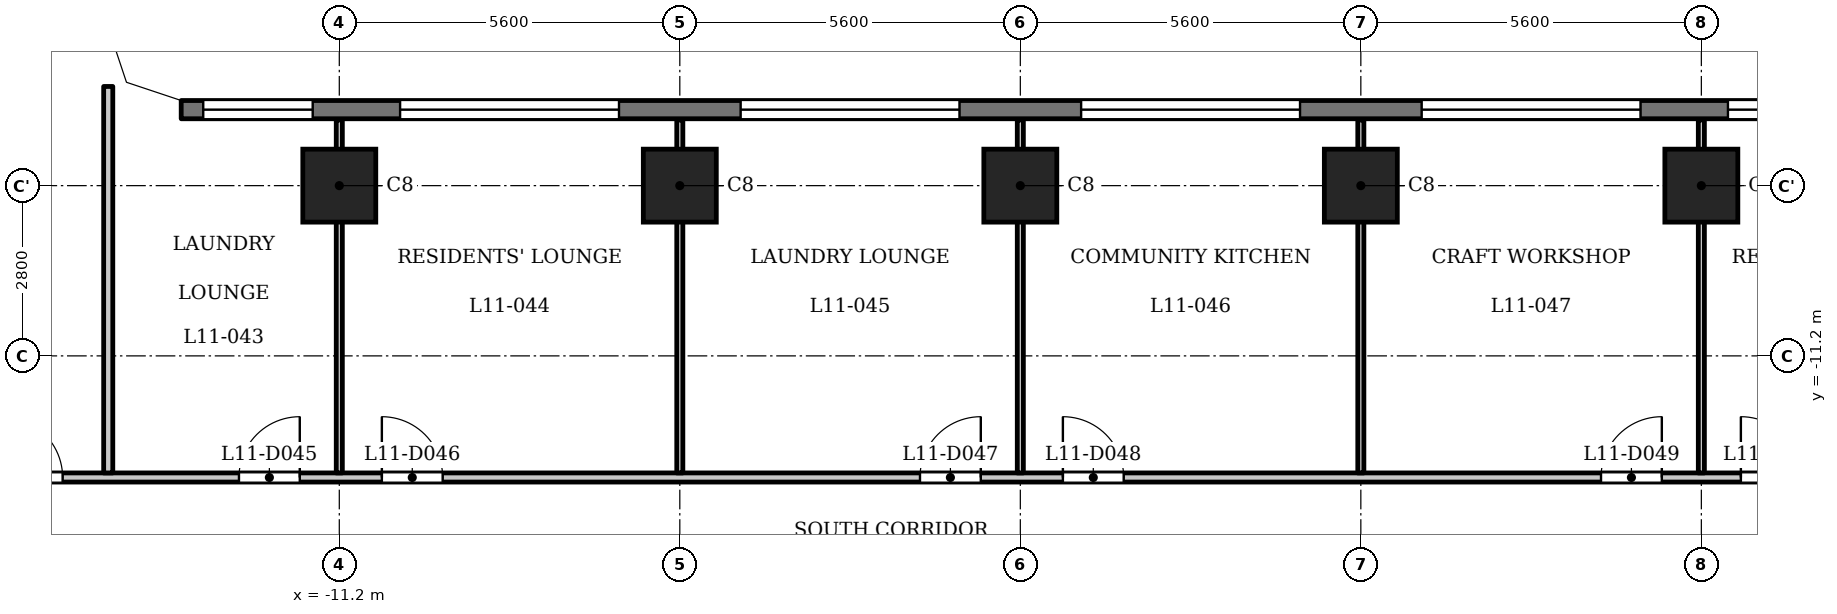
"""IFC4 building model, lengths in metres.
Left out: names, types, materials, properties, quantities, classifications, styles, units other than length and angle.
Written with IfcOpenShell. Run it as: python <this file> out.ifc"""

import sys

from ifc_helpers import new_model, si_unit, direction, frame, frame_2d, origin, origin_2d, place, context, subcontext, project, spatial, polyline, rectangle, outline, extrude, element, fill, save


model = new_model("IFC4")
c1 = context("Model", 3, precision=1e-05, world=origin(), true_north=direction((0.0, 1.0)))
c2 = subcontext(c1, "Body", "Model", "MODEL_VIEW")
j1 = project(units=[si_unit("LENGTHUNIT", "METRE"), si_unit("PLANEANGLEUNIT", "RADIAN")], contexts=[c1])
p1 = place(None, origin())
s1 = spatial("IfcSite", under=j1, at=p1, CompositionType="ELEMENT")
p2 = place(p1, origin())
s2 = spatial("IfcBuilding", under=s1, at=p2, CompositionType="ELEMENT")
p3 = place(p2, frame((0.0, 0.0, 48.0)))
s3 = spatial("IfcBuildingStorey", under=s2, at=p3, CompositionType="ELEMENT", Elevation=48.0)
for number, where, z_axis, x_axis in (
    (1, (-11.2, -8.4, 0.0), (0.0, 0.0, 1.0), (1.0, 0.0, 0.0)),
    (2, (-5.6, -8.4, 0.0), (0.0, 0.0, 1.0), (1.0, 0.0, 0.0)),
    (3, (0.0, -8.4, 0.0), (0.0, 0.0, 1.0), (1.0, 0.0, 0.0)),
    (4, (5.6, -8.4, 0.0), (0.0, 0.0, 1.0), (1.0, 0.0, 0.0)),
    (5, (11.2, -8.4, 0.0), (0.0, 0.0, 1.0), (1.0, 0.0, 0.0)),
):
    element("IfcColumn", number, at=place(p3, frame(where, z_axis=z_axis, x_axis=x_axis)), inside=s3, PredefinedType="COLUMN", context=c2, shape_type="SweptSolid", body=[
        extrude(rectangle(XDim=1.2, YDim=1.2, at=origin_2d()), origin(), (0.0, 0.0, 1.0), 3.5),
    ])
p4 = place(p3, frame((13.8, -7.15, 0.0), z_axis=(0.0, 0.0, 1.0), x_axis=(-1.0, 0.0, 0.0)))
e6 = element("IfcWall", 6, at=p4, inside=s3, PredefinedType="SOLIDWALL", context=c2, shape_type="SweptSolid", body=[
    extrude(rectangle(XDim=27.6, YDim=0.3, at=frame_2d((13.8, 0.0))), origin(), (0.0, 0.0, 1.0), 3.2),
])
p5 = place(p4, frame((0.363, 0.0, 0.9)))
e7 = element("IfcOpeningElement", 7, at=p5, cuts=e6, PredefinedType="OPENING", context=c2, shape_type="SweptSolid", body=[
    extrude(rectangle(XDim=1.8, YDim=1.25, at=frame_2d((0.9, 0.625))), frame((0.0, 0.16, 0.0), z_axis=(0.0, -1.0, 0.0), x_axis=(1.0, 0.0, 0.0)), (0.0, 0.0, 1.0), 0.32),
])
p6 = place(p4, frame((3.6, 0.0, 1.2)))
e8 = element("IfcOpeningElement", 8, at=p6, cuts=e6, PredefinedType="OPENING", context=c2, shape_type="SweptSolid", body=[
    extrude(rectangle(XDim=3.6, YDim=0.95, at=frame_2d((1.8, 0.475))), frame((0.0, 0.16, 0.0), z_axis=(0.0, -1.0, 0.0), x_axis=(1.0, 0.0, 0.0)), (0.0, 0.0, 1.0), 0.32),
])
p7 = place(p4, frame((9.2, 0.0, 1.2)))
e9 = element("IfcOpeningElement", 9, at=p7, cuts=e6, PredefinedType="OPENING", context=c2, shape_type="SweptSolid", body=[
    extrude(rectangle(XDim=3.6, YDim=0.95, at=frame_2d((1.8, 0.475))), frame((0.0, 0.16, 0.0), z_axis=(0.0, -1.0, 0.0), x_axis=(1.0, 0.0, 0.0)), (0.0, 0.0, 1.0), 0.32),
])
p8 = place(p4, frame((14.8, 0.0, 1.2)))
e10 = element("IfcOpeningElement", 10, at=p8, cuts=e6, PredefinedType="OPENING", context=c2, shape_type="SweptSolid", body=[
    extrude(rectangle(XDim=3.6, YDim=0.95, at=frame_2d((1.8, 0.475))), frame((0.0, 0.16, 0.0), z_axis=(0.0, -1.0, 0.0), x_axis=(1.0, 0.0, 0.0)), (0.0, 0.0, 1.0), 0.32),
])
p9 = place(p4, frame((20.4, 0.0, 1.2)))
e11 = element("IfcOpeningElement", 11, at=p9, cuts=e6, PredefinedType="OPENING", context=c2, shape_type="SweptSolid", body=[
    extrude(rectangle(XDim=3.6, YDim=0.95, at=frame_2d((1.8, 0.475))), frame((0.0, 0.16, 0.0), z_axis=(0.0, -1.0, 0.0), x_axis=(1.0, 0.0, 0.0)), (0.0, 0.0, 1.0), 0.32),
])
p10 = place(p4, frame((25.438, 0.0, 0.9)))
e12 = element("IfcOpeningElement", 12, at=p10, cuts=e6, PredefinedType="OPENING", context=c2, shape_type="SweptSolid", body=[
    extrude(rectangle(XDim=1.8, YDim=1.25, at=frame_2d((0.9, 0.625))), frame((0.0, 0.16, 0.0), z_axis=(0.0, -1.0, 0.0), x_axis=(1.0, 0.0, 0.0)), (0.0, 0.0, 1.0), 0.32),
])
p11 = place(p3, frame((-17.4, -13.2, 0.0), z_axis=(0.0, 0.0, 1.0), x_axis=(1.0, 0.0, 0.0)))
e13 = element("IfcWall", 13, at=p11, inside=s3, PredefinedType="PARTITIONING", context=c2, shape_type="SweptSolid", body=[
    extrude(rectangle(XDim=34.8, YDim=0.15, at=frame_2d((17.4, 0.0))), origin(), (0.0, 0.0, 1.0), 3.2),
])
p12 = place(p11, frame((0.65, 0.0, 0.0)))
e14 = element("IfcOpeningElement", 14, at=p12, cuts=e13, PredefinedType="OPENING", context=c2, shape_type="SweptSolid", body=[
    extrude(rectangle(XDim=1.0, YDim=2.1, at=frame_2d((0.5, 1.05))), frame((0.0, 0.085, 0.0), z_axis=(0.0, -1.0, 0.0), x_axis=(1.0, 0.0, 0.0)), (0.0, 0.0, 1.0), 0.17),
])
p13 = place(p11, frame((33.05, 0.0, 0.0)))
e15 = element("IfcOpeningElement", 15, at=p13, cuts=e13, PredefinedType="OPENING", context=c2, shape_type="SweptSolid", body=[
    extrude(rectangle(XDim=1.0, YDim=2.1, at=frame_2d((0.5, 1.05))), frame((0.0, 0.085, 0.0), z_axis=(0.0, -1.0, 0.0), x_axis=(1.0, 0.0, 0.0)), (0.0, 0.0, 1.0), 0.17),
])
p14 = place(p11, frame((4.55, 0.0, 0.0)))
e16 = element("IfcOpeningElement", 16, at=p14, cuts=e13, PredefinedType="OPENING", context=c2, shape_type="SweptSolid", body=[
    extrude(rectangle(XDim=1.0, YDim=2.1, at=frame_2d((0.5, 1.05))), frame((0.0, 0.085, 0.0), z_axis=(0.0, -1.0, 0.0), x_axis=(1.0, 0.0, 0.0)), (0.0, 0.0, 1.0), 0.17),
])
p15 = place(p11, frame((6.9, 0.0, 0.0)))
e17 = element("IfcOpeningElement", 17, at=p15, cuts=e13, PredefinedType="OPENING", context=c2, shape_type="SweptSolid", body=[
    extrude(rectangle(XDim=1.0, YDim=2.1, at=frame_2d((0.5, 1.05))), frame((0.0, 0.085, 0.0), z_axis=(0.0, -1.0, 0.0), x_axis=(1.0, 0.0, 0.0)), (0.0, 0.0, 1.0), 0.17),
])
p16 = place(p11, frame((15.75, 0.0, 0.0)))
e18 = element("IfcOpeningElement", 18, at=p16, cuts=e13, PredefinedType="OPENING", context=c2, shape_type="SweptSolid", body=[
    extrude(rectangle(XDim=1.0, YDim=2.1, at=frame_2d((0.5, 1.05))), frame((0.0, 0.085, 0.0), z_axis=(0.0, -1.0, 0.0), x_axis=(1.0, 0.0, 0.0)), (0.0, 0.0, 1.0), 0.17),
])
p17 = place(p11, frame((18.1, 0.0, 0.0)))
e19 = element("IfcOpeningElement", 19, at=p17, cuts=e13, PredefinedType="OPENING", context=c2, shape_type="SweptSolid", body=[
    extrude(rectangle(XDim=1.0, YDim=2.1, at=frame_2d((0.5, 1.05))), frame((0.0, 0.085, 0.0), z_axis=(0.0, -1.0, 0.0), x_axis=(1.0, 0.0, 0.0)), (0.0, 0.0, 1.0), 0.17),
])
p18 = place(p11, frame((26.95, 0.0, 0.0)))
e20 = element("IfcOpeningElement", 20, at=p18, cuts=e13, PredefinedType="OPENING", context=c2, shape_type="SweptSolid", body=[
    extrude(rectangle(XDim=1.0, YDim=2.1, at=frame_2d((0.5, 1.05))), frame((0.0, 0.085, 0.0), z_axis=(0.0, -1.0, 0.0), x_axis=(1.0, 0.0, 0.0)), (0.0, 0.0, 1.0), 0.17),
])
p19 = place(p11, frame((29.25, 0.0, 0.0)))
e21 = element("IfcOpeningElement", 21, at=p19, cuts=e13, PredefinedType="OPENING", context=c2, shape_type="SweptSolid", body=[
    extrude(rectangle(XDim=1.0, YDim=2.1, at=frame_2d((0.5, 1.05))), frame((0.0, 0.085, 0.0), z_axis=(0.0, -1.0, 0.0), x_axis=(1.0, 0.0, 0.0)), (0.0, 0.0, 1.0), 0.17),
])
p20 = place(p3, frame((-15.0, -13.125, 0.0), z_axis=(0.0, 0.0, 1.0), x_axis=(0.0, 1.0, 0.0)))
e22 = element("IfcWall", 22, at=p20, inside=s3, PredefinedType="PARTITIONING", context=c2, shape_type="SweptSolid", body=[
    extrude(rectangle(XDim=6.356, YDim=0.15, at=frame_2d((3.178, 0.0))), origin(), (0.0, 0.0, 1.0), 3.2),
])
for number, where, z_axis, x_axis in (
    (23, (-11.2, -13.125, 0.0), (0.0, 0.0, 1.0), (0.0, 1.0, 0.0)),
    (24, (-5.6, -13.125, 0.0), (0.0, 0.0, 1.0), (0.0, 1.0, 0.0)),
    (25, (0.0, -13.125, 0.0), (0.0, 0.0, 1.0), (0.0, 1.0, 0.0)),
    (26, (5.6, -13.125, 0.0), (0.0, 0.0, 1.0), (0.0, 1.0, 0.0)),
    (27, (11.2, -13.125, 0.0), (0.0, 0.0, 1.0), (0.0, 1.0, 0.0)),
):
    element("IfcWall", number, at=place(p3, frame(where, z_axis=z_axis, x_axis=x_axis)), inside=s3, PredefinedType="PARTITIONING", context=c2, shape_type="SweptSolid", body=[
        extrude(rectangle(XDim=5.805, YDim=0.1, at=frame_2d((2.902, 0.0))), origin(), (0.0, 0.0, 1.0), 3.2),
    ])
p21 = place(p3, origin())
e28 = element("IfcWall", 28, at=p21, inside=s3, PredefinedType="SOLIDWALL", context=c2, shape_type="SweptSolid", body=[
    extrude(outline(polyline([(-14.937, -6.937), (-13.849, -7.3), (-13.8, -7.3), (-13.8, -7.0), (-14.7, -6.7), (-15.0, -5.8), (-15.3, -5.8), (-15.3, -5.849), (-14.937, -6.937)])), origin(), (0.0, 0.0, 1.0), 3.2),
])
p22 = place(p12, origin())
e29 = element("IfcDoor", 29, at=p22, inside=s3, OperationType="SINGLE_SWING_RIGHT", PredefinedType="DOOR", context=c2, shape_type="SweptSolid", body=[
    extrude(rectangle(XDim=1.0, YDim=2.1, at=frame_2d((0.5, 1.05))), frame((0.0, 0.025, 0.0), z_axis=(0.0, -1.0, 0.0), x_axis=(1.0, 0.0, 0.0)), (0.0, 0.0, 1.0), 0.05),
])
fill(e14, e29)
p23 = place(p14, origin())
e30 = element("IfcDoor", 30, at=p23, inside=s3, OperationType="SINGLE_SWING_LEFT", PredefinedType="DOOR", context=c2, shape_type="SweptSolid", body=[
    extrude(rectangle(XDim=1.0, YDim=2.1, at=frame_2d((0.5, 1.05))), frame((0.0, 0.025, 0.0), z_axis=(0.0, -1.0, 0.0), x_axis=(1.0, 0.0, 0.0)), (0.0, 0.0, 1.0), 0.05),
])
fill(e16, e30)
p24 = place(p15, origin())
e31 = element("IfcDoor", 31, at=p24, inside=s3, OperationType="SINGLE_SWING_RIGHT", PredefinedType="DOOR", context=c2, shape_type="SweptSolid", body=[
    extrude(rectangle(XDim=1.0, YDim=2.1, at=frame_2d((0.5, 1.05))), frame((0.0, 0.025, 0.0), z_axis=(0.0, -1.0, 0.0), x_axis=(1.0, 0.0, 0.0)), (0.0, 0.0, 1.0), 0.05),
])
fill(e17, e31)
p25 = place(p16, origin())
e32 = element("IfcDoor", 32, at=p25, inside=s3, OperationType="SINGLE_SWING_LEFT", PredefinedType="DOOR", context=c2, shape_type="SweptSolid", body=[
    extrude(rectangle(XDim=1.0, YDim=2.1, at=frame_2d((0.5, 1.05))), frame((0.0, 0.025, 0.0), z_axis=(0.0, -1.0, 0.0), x_axis=(1.0, 0.0, 0.0)), (0.0, 0.0, 1.0), 0.05),
])
fill(e18, e32)
p26 = place(p17, origin())
e33 = element("IfcDoor", 33, at=p26, inside=s3, OperationType="SINGLE_SWING_RIGHT", PredefinedType="DOOR", context=c2, shape_type="SweptSolid", body=[
    extrude(rectangle(XDim=1.0, YDim=2.1, at=frame_2d((0.5, 1.05))), frame((0.0, 0.025, 0.0), z_axis=(0.0, -1.0, 0.0), x_axis=(1.0, 0.0, 0.0)), (0.0, 0.0, 1.0), 0.05),
])
fill(e19, e33)
p27 = place(p18, origin())
e34 = element("IfcDoor", 34, at=p27, inside=s3, OperationType="SINGLE_SWING_LEFT", PredefinedType="DOOR", context=c2, shape_type="SweptSolid", body=[
    extrude(rectangle(XDim=1.0, YDim=2.1, at=frame_2d((0.5, 1.05))), frame((0.0, 0.025, 0.0), z_axis=(0.0, -1.0, 0.0), x_axis=(1.0, 0.0, 0.0)), (0.0, 0.0, 1.0), 0.05),
])
fill(e20, e34)
p28 = place(p19, origin())
e35 = element("IfcDoor", 35, at=p28, inside=s3, OperationType="SINGLE_SWING_RIGHT", PredefinedType="DOOR", context=c2, shape_type="SweptSolid", body=[
    extrude(rectangle(XDim=1.0, YDim=2.1, at=frame_2d((0.5, 1.05))), frame((0.0, 0.025, 0.0), z_axis=(0.0, -1.0, 0.0), x_axis=(1.0, 0.0, 0.0)), (0.0, 0.0, 1.0), 0.05),
])
fill(e21, e35)
p29 = place(p5, origin())
e36 = element("IfcWindow", 36, at=p29, inside=s3, PartitioningType="SINGLE_PANEL", PredefinedType="WINDOW", context=c2, shape_type="SweptSolid", body=[
    extrude(rectangle(XDim=1.8, YDim=1.25, at=frame_2d((0.9, 0.625))), frame((0.0, 0.03, 0.0), z_axis=(0.0, -1.0, 0.0), x_axis=(1.0, 0.0, 0.0)), (0.0, 0.0, 1.0), 0.06),
])
fill(e7, e36)
p30 = place(p6, origin())
e37 = element("IfcWindow", 37, at=p30, inside=s3, PartitioningType="SINGLE_PANEL", PredefinedType="WINDOW", context=c2, shape_type="SweptSolid", body=[
    extrude(rectangle(XDim=3.6, YDim=0.95, at=frame_2d((1.8, 0.475))), frame((0.0, 0.03, 0.0), z_axis=(0.0, -1.0, 0.0), x_axis=(1.0, 0.0, 0.0)), (0.0, 0.0, 1.0), 0.06),
])
fill(e8, e37)
p31 = place(p7, origin())
e38 = element("IfcWindow", 38, at=p31, inside=s3, PartitioningType="SINGLE_PANEL", PredefinedType="WINDOW", context=c2, shape_type="SweptSolid", body=[
    extrude(rectangle(XDim=3.6, YDim=0.95, at=frame_2d((1.8, 0.475))), frame((0.0, 0.03, 0.0), z_axis=(0.0, -1.0, 0.0), x_axis=(1.0, 0.0, 0.0)), (0.0, 0.0, 1.0), 0.06),
])
fill(e9, e38)
p32 = place(p8, origin())
e39 = element("IfcWindow", 39, at=p32, inside=s3, PartitioningType="SINGLE_PANEL", PredefinedType="WINDOW", context=c2, shape_type="SweptSolid", body=[
    extrude(rectangle(XDim=3.6, YDim=0.95, at=frame_2d((1.8, 0.475))), frame((0.0, 0.03, 0.0), z_axis=(0.0, -1.0, 0.0), x_axis=(1.0, 0.0, 0.0)), (0.0, 0.0, 1.0), 0.06),
])
fill(e10, e39)
p33 = place(p9, origin())
e40 = element("IfcWindow", 40, at=p33, inside=s3, PartitioningType="SINGLE_PANEL", PredefinedType="WINDOW", context=c2, shape_type="SweptSolid", body=[
    extrude(rectangle(XDim=3.6, YDim=0.95, at=frame_2d((1.8, 0.475))), frame((0.0, 0.03, 0.0), z_axis=(0.0, -1.0, 0.0), x_axis=(1.0, 0.0, 0.0)), (0.0, 0.0, 1.0), 0.06),
])
fill(e11, e40)
p34 = place(p10, origin())
e41 = element("IfcWindow", 41, at=p34, inside=s3, PartitioningType="SINGLE_PANEL", PredefinedType="WINDOW", context=c2, shape_type="SweptSolid", body=[
    extrude(rectangle(XDim=1.8, YDim=1.25, at=frame_2d((0.9, 0.625))), frame((0.0, 0.03, 0.0), z_axis=(0.0, -1.0, 0.0), x_axis=(1.0, 0.0, 0.0)), (0.0, 0.0, 1.0), 0.06),
])
fill(e12, e41)
save(model, sys.argv[1])
